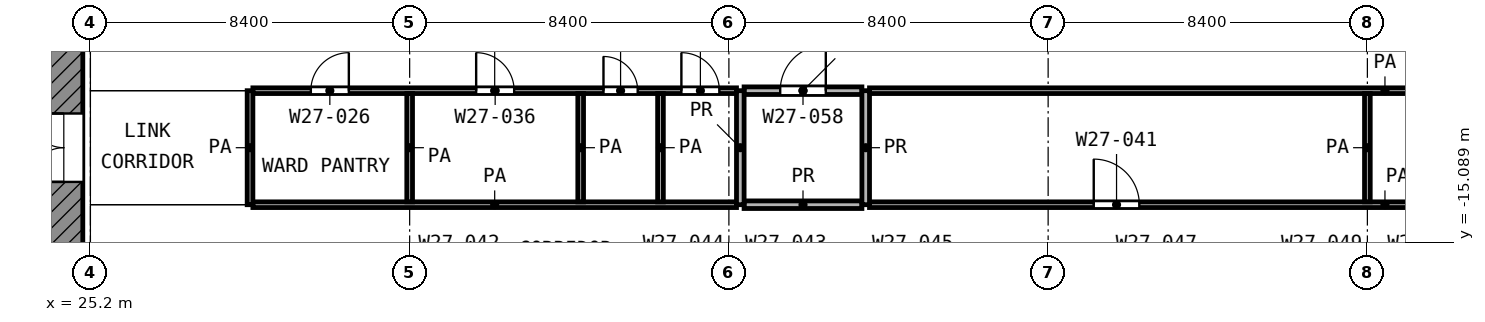
"""IFC4 building model, lengths in metres.
Left out: names, types, materials, properties, quantities, classifications, styles, units other than length and angle.
Written with IfcOpenShell. Run it as: python <this file> out.ifc"""

import sys

from ifc_helpers import new_model, si_unit, direction, frame, frame_2d, origin, place, context, subcontext, project, spatial, rectangle, extrude, element, fill, save


model = new_model("IFC4")
c1 = context("Model", 3, precision=1e-05, world=origin(), true_north=direction((0.0, 1.0)))
c2 = subcontext(c1, "Body", "Model", "MODEL_VIEW")
j1 = project(units=[si_unit("LENGTHUNIT", "METRE"), si_unit("PLANEANGLEUNIT", "RADIAN")], contexts=[c1])
p1 = place(None, origin())
s1 = spatial("IfcSite", under=j1, at=p1, CompositionType="ELEMENT")
p2 = place(p1, origin())
s2 = spatial("IfcBuilding", under=s1, at=p2, CompositionType="ELEMENT")
p3 = place(p2, frame((0.0, 0.0, 119.8)))
s3 = spatial("IfcBuildingStorey", under=s2, at=p3, CompositionType="ELEMENT", Elevation=119.8)
p4 = place(p3, frame((24.5, -24.0, 0.0), z_axis=(0.0, 0.0, 1.0), x_axis=(0.0, 1.0, 0.0)))
e1 = element("IfcWall", 1, at=p4, inside=s3, PredefinedType="SHEAR", context=c2, shape_type="SweptSolid", body=[
    extrude(rectangle(XDim=18.6, YDim=1.0, at=frame_2d((9.3, 0.0))), origin(), (0.0, 0.0, 1.0), 3.6),
])
p5 = place(p4, frame((10.5, 0.0, 0.0)))
e2 = element("IfcOpeningElement", 2, at=p5, cuts=e1, PredefinedType="OPENING", context=c2, shape_type="SweptSolid", body=[
    extrude(rectangle(XDim=1.8, YDim=2.1, at=frame_2d((0.9, 1.05))), frame((0.0, 0.51, 0.0), z_axis=(0.0, -1.0, 0.0), x_axis=(1.0, 0.0, 0.0)), (0.0, 0.0, 1.0), 1.02),
])
p6 = place(p3, frame((29.475, -14.1, 0.0), z_axis=(0.0, 0.0, 1.0), x_axis=(1.0, 0.0, 0.0)))
e3 = element("IfcWall", 3, at=p6, inside=s3, PredefinedType="PARTITIONING", context=c2, shape_type="SweptSolid", body=[
    extrude(rectangle(XDim=12.725, YDim=0.15, at=frame_2d((6.362, 0.0))), origin(), (0.0, 0.0, 1.0), 3.6),
])
p7 = place(p3, frame((45.7, -14.1, 0.0), z_axis=(0.0, 0.0, 1.0), x_axis=(1.0, 0.0, 0.0)))
e4 = element("IfcWall", 4, at=p7, inside=s3, PredefinedType="PARTITIONING", context=c2, shape_type="SweptSolid", body=[
    extrude(rectangle(XDim=27.125, YDim=0.15, at=frame_2d((13.562, 0.0))), origin(), (0.0, 0.0, 1.0), 3.6),
])
p8 = place(p7, frame((5.9, 0.0, 0.0)))
e5 = element("IfcOpeningElement", 5, at=p8, cuts=e4, PredefinedType="OPENING", context=c2, shape_type="SweptSolid", body=[
    extrude(rectangle(XDim=1.2, YDim=2.1, at=frame_2d((0.6, 1.05))), frame((0.0, 0.085, 0.0), z_axis=(0.0, -1.0, 0.0), x_axis=(1.0, 0.0, 0.0)), (0.0, 0.0, 1.0), 0.17),
])
p9 = place(p7, frame((19.65, 0.0, 0.0)))
e6 = element("IfcOpeningElement", 6, at=p9, cuts=e4, PredefinedType="OPENING", context=c2, shape_type="SweptSolid", body=[
    extrude(rectangle(XDim=1.0, YDim=2.1, at=frame_2d((0.5, 1.05))), frame((0.0, 0.085, 0.0), z_axis=(0.0, -1.0, 0.0), x_axis=(1.0, 0.0, 0.0)), (0.0, 0.0, 1.0), 0.17),
])
p10 = place(p3, frame((29.475, -11.1, 0.0), z_axis=(0.0, 0.0, 1.0), x_axis=(1.0, 0.0, 0.0)))
e7 = element("IfcWall", 7, at=p10, inside=s3, PredefinedType="PARTITIONING", context=c2, shape_type="SweptSolid", body=[
    extrude(rectangle(XDim=12.725, YDim=0.15, at=frame_2d((6.362, 0.0))), origin(), (0.0, 0.0, 1.0), 3.6),
])
p11 = place(p10, frame((1.525, 0.0, 0.0)))
e8 = element("IfcOpeningElement", 8, at=p11, cuts=e7, PredefinedType="OPENING", context=c2, shape_type="SweptSolid", body=[
    extrude(rectangle(XDim=1.0, YDim=2.1, at=frame_2d((0.5, 1.05))), frame((0.0, 0.085, 0.0), z_axis=(0.0, -1.0, 0.0), x_axis=(1.0, 0.0, 0.0)), (0.0, 0.0, 1.0), 0.17),
])
p12 = place(p10, frame((9.225, 0.0, 0.0)))
e9 = element("IfcOpeningElement", 9, at=p12, cuts=e7, PredefinedType="OPENING", context=c2, shape_type="SweptSolid", body=[
    extrude(rectangle(XDim=0.9, YDim=2.1, at=frame_2d((0.45, 1.05))), frame((0.0, 0.085, 0.0), z_axis=(0.0, -1.0, 0.0), x_axis=(1.0, 0.0, 0.0)), (0.0, 0.0, 1.0), 0.17),
])
p13 = place(p10, frame((11.275, 0.0, 0.0)))
e10 = element("IfcOpeningElement", 10, at=p13, cuts=e7, PredefinedType="OPENING", context=c2, shape_type="SweptSolid", body=[
    extrude(rectangle(XDim=1.0, YDim=2.1, at=frame_2d((0.5, 1.05))), frame((0.0, 0.085, 0.0), z_axis=(0.0, -1.0, 0.0), x_axis=(1.0, 0.0, 0.0)), (0.0, 0.0, 1.0), 0.17),
])
p14 = place(p10, frame((5.875, 0.0, 0.0)))
e11 = element("IfcOpeningElement", 11, at=p14, cuts=e7, PredefinedType="OPENING", context=c2, shape_type="SweptSolid", body=[
    extrude(rectangle(XDim=1.0, YDim=2.1, at=frame_2d((0.5, 1.05))), frame((0.0, 0.085, 0.0), z_axis=(0.0, -1.0, 0.0), x_axis=(1.0, 0.0, 0.0)), (0.0, 0.0, 1.0), 0.17),
])
p15 = place(p3, frame((45.7, -11.1, 0.0), z_axis=(0.0, 0.0, 1.0), x_axis=(1.0, 0.0, 0.0)))
e12 = element("IfcWall", 12, at=p15, inside=s3, PredefinedType="PARTITIONING", context=c2, shape_type="SweptSolid", body=[
    extrude(rectangle(XDim=27.125, YDim=0.15, at=frame_2d((13.562, 0.0))), origin(), (0.0, 0.0, 1.0), 3.6),
])
p16 = place(p3, frame((29.4, -14.1, 0.0), z_axis=(0.0, 0.0, 1.0), x_axis=(0.0, 1.0, 0.0)))
e13 = element("IfcWall", 13, at=p16, inside=s3, PredefinedType="PARTITIONING", context=c2, shape_type="SweptSolid", body=[
    extrude(rectangle(XDim=3.0, YDim=0.15, at=frame_2d((1.5, 0.0))), origin(), (0.0, 0.0, 1.0), 3.6),
])
for number, where, z_axis, x_axis in (
    (14, (33.6, -14.025, 0.0), (0.0, 0.0, 1.0), (0.0, 1.0, 0.0)),
    (15, (38.1, -14.025, 0.0), (0.0, 0.0, 1.0), (0.0, 1.0, 0.0)),
    (16, (40.2, -14.025, 0.0), (0.0, 0.0, 1.0), (0.0, 1.0, 0.0)),
    (17, (58.8, -14.025, 0.0), (0.0, 0.0, 1.0), (0.0, 1.0, 0.0)),
):
    element("IfcWall", number, at=place(p3, frame(where, z_axis=z_axis, x_axis=x_axis)), inside=s3, PredefinedType="PARTITIONING", context=c2, shape_type="SweptSolid", body=[
        extrude(rectangle(XDim=2.85, YDim=0.15, at=frame_2d((1.425, 0.0))), origin(), (0.0, 0.0, 1.0), 3.6),
    ])
p17 = place(p3, frame((42.4, -14.1, 0.0), z_axis=(0.0, 0.0, 1.0), x_axis=(1.0, 0.0, 0.0)))
e18 = element("IfcWall", 18, at=p17, inside=s3, PredefinedType="PARTITIONING", context=c2, shape_type="SweptSolid", body=[
    extrude(rectangle(XDim=3.1, YDim=0.2, at=frame_2d((1.55, 0.0))), origin(), (0.0, 0.0, 1.0), 3.6),
])
p18 = place(p3, frame((42.4, -11.1, 0.0), z_axis=(0.0, 0.0, 1.0), x_axis=(1.0, 0.0, 0.0)))
e19 = element("IfcWall", 19, at=p18, inside=s3, PredefinedType="PARTITIONING", context=c2, shape_type="SweptSolid", body=[
    extrude(rectangle(XDim=3.1, YDim=0.2, at=frame_2d((1.55, 0.0))), origin(), (0.0, 0.0, 1.0), 3.6),
])
p19 = place(p18, frame((0.95, 0.0, 0.0)))
e20 = element("IfcOpeningElement", 20, at=p19, cuts=e19, PredefinedType="OPENING", context=c2, shape_type="SweptSolid", body=[
    extrude(rectangle(XDim=1.2, YDim=2.1, at=frame_2d((0.6, 1.05))), frame((0.0, 0.11, 0.0), z_axis=(0.0, -1.0, 0.0), x_axis=(1.0, 0.0, 0.0)), (0.0, 0.0, 1.0), 0.22),
])
for number, where, z_axis, x_axis in (
    (21, (42.3, -14.1, 0.0), (0.0, 0.0, 1.0), (0.0, 1.0, 0.0)),
    (22, (45.6, -14.1, 0.0), (0.0, 0.0, 1.0), (0.0, 1.0, 0.0)),
):
    element("IfcWall", number, at=place(p3, frame(where, z_axis=z_axis, x_axis=x_axis)), inside=s3, PredefinedType="PARTITIONING", context=c2, shape_type="SweptSolid", body=[
        extrude(rectangle(XDim=3.0, YDim=0.2, at=frame_2d((1.5, 0.0))), origin(), (0.0, 0.0, 1.0), 3.6),
    ])
p20 = place(p5, origin())
e23 = element("IfcDoor", 23, at=p20, inside=s3, OperationType="DOUBLE_DOOR_SINGLE_SWING", PredefinedType="DOOR", context=c2, shape_type="SweptSolid", body=[
    extrude(rectangle(XDim=1.8, YDim=2.1, at=frame_2d((0.9, 1.05))), frame((0.0, 0.025, 0.0), z_axis=(0.0, -1.0, 0.0), x_axis=(1.0, 0.0, 0.0)), (0.0, 0.0, 1.0), 0.05),
])
fill(e2, e23)
p21 = place(p11, origin())
e24 = element("IfcDoor", 24, at=p21, inside=s3, OperationType="SINGLE_SWING_RIGHT", PredefinedType="DOOR", context=c2, shape_type="SweptSolid", body=[
    extrude(rectangle(XDim=1.0, YDim=2.1, at=frame_2d((0.5, 1.05))), frame((0.0, 0.025, 0.0), z_axis=(0.0, -1.0, 0.0), x_axis=(1.0, 0.0, 0.0)), (0.0, 0.0, 1.0), 0.05),
])
fill(e8, e24)
p22 = place(p8, origin())
e25 = element("IfcDoor", 25, at=p22, inside=s3, OperationType="SINGLE_SWING_LEFT", PredefinedType="DOOR", context=c2, shape_type="SweptSolid", body=[
    extrude(rectangle(XDim=1.2, YDim=2.1, at=frame_2d((0.6, 1.05))), frame((0.0, 0.025, 0.0), z_axis=(0.0, -1.0, 0.0), x_axis=(1.0, 0.0, 0.0)), (0.0, 0.0, 1.0), 0.05),
])
fill(e5, e25)
p23 = place(p12, origin())
e26 = element("IfcDoor", 26, at=p23, inside=s3, OperationType="SINGLE_SWING_LEFT", PredefinedType="DOOR", context=c2, shape_type="SweptSolid", body=[
    extrude(rectangle(XDim=0.9, YDim=2.1, at=frame_2d((0.45, 1.05))), frame((0.0, 0.025, 0.0), z_axis=(0.0, -1.0, 0.0), x_axis=(1.0, 0.0, 0.0)), (0.0, 0.0, 1.0), 0.05),
])
fill(e9, e26)
p24 = place(p13, origin())
e27 = element("IfcDoor", 27, at=p24, inside=s3, OperationType="SINGLE_SWING_LEFT", PredefinedType="DOOR", context=c2, shape_type="SweptSolid", body=[
    extrude(rectangle(XDim=1.0, YDim=2.1, at=frame_2d((0.5, 1.05))), frame((0.0, 0.025, 0.0), z_axis=(0.0, -1.0, 0.0), x_axis=(1.0, 0.0, 0.0)), (0.0, 0.0, 1.0), 0.05),
])
fill(e10, e27)
p25 = place(p19, origin())
e28 = element("IfcDoor", 28, at=p25, inside=s3, OperationType="SINGLE_SWING_RIGHT", PredefinedType="DOOR", context=c2, shape_type="SweptSolid", body=[
    extrude(rectangle(XDim=1.2, YDim=2.1, at=frame_2d((0.6, 1.05))), frame((0.0, 0.025, 0.0), z_axis=(0.0, -1.0, 0.0), x_axis=(1.0, 0.0, 0.0)), (0.0, 0.0, 1.0), 0.05),
])
fill(e20, e28)
p26 = place(p14, origin())
e29 = element("IfcDoor", 29, at=p26, inside=s3, OperationType="SINGLE_SWING_LEFT", PredefinedType="DOOR", context=c2, shape_type="SweptSolid", body=[
    extrude(rectangle(XDim=1.0, YDim=2.1, at=frame_2d((0.5, 1.05))), frame((0.0, 0.025, 0.0), z_axis=(0.0, -1.0, 0.0), x_axis=(1.0, 0.0, 0.0)), (0.0, 0.0, 1.0), 0.05),
])
fill(e11, e29)
save(model, sys.argv[1])
